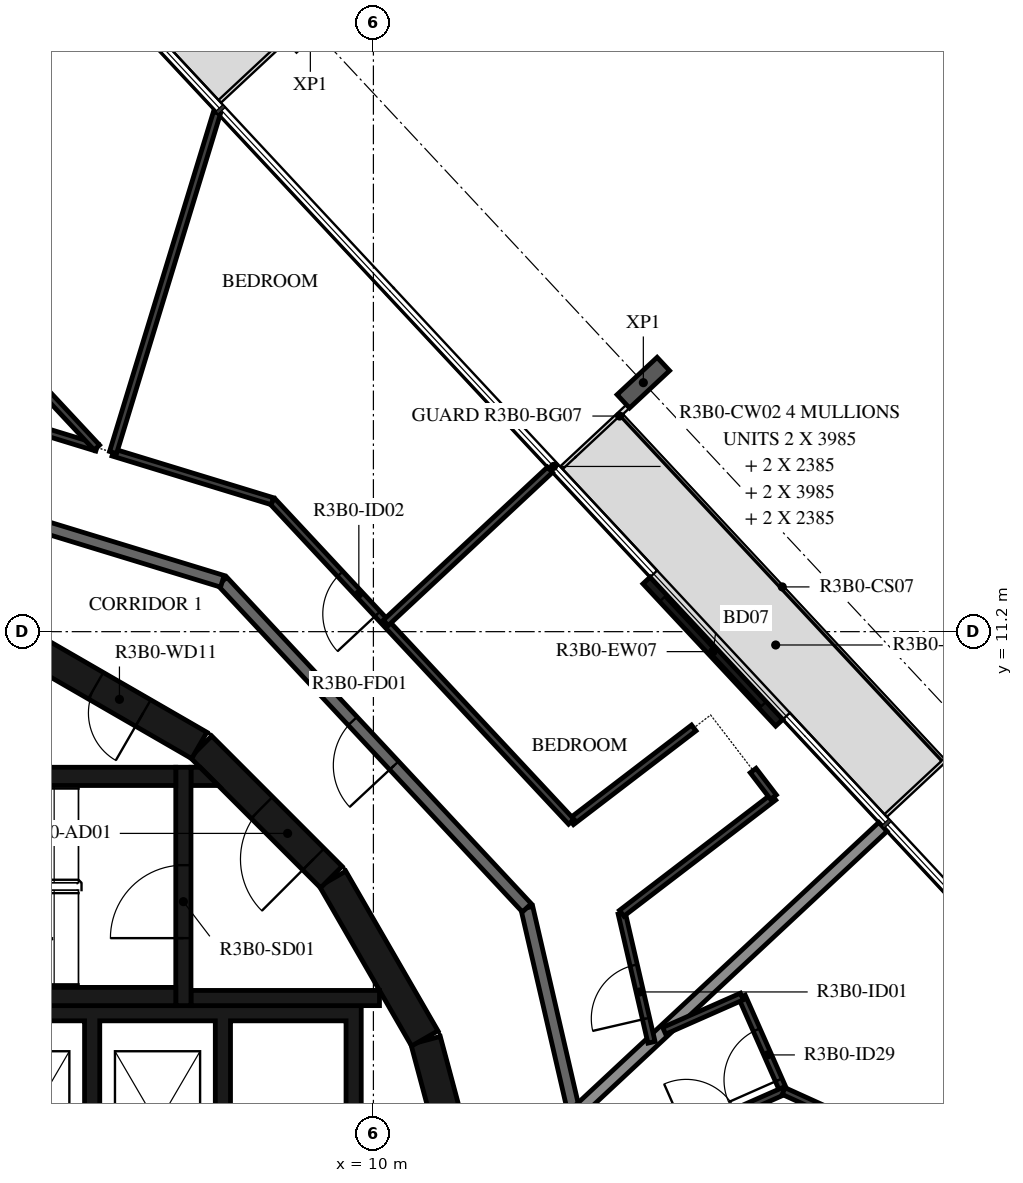
"""IFC4 building model, lengths in metres.
Left out: names, types, materials, properties, quantities, classifications, styles, units other than length and angle.
Written with IfcOpenShell. Run it as: python <this file> out.ifc"""

import sys

from ifc_helpers import new_model, si_unit, direction, frame, frame_2d, origin, origin_2d, place, context, subcontext, project, spatial, polyline, rectangle, i_section, outline, extrude, element, fill, save


model = new_model("IFC4")
c1 = context("Model", 3, precision=1e-05, world=origin(), true_north=direction((0.0, 1.0)))
c2 = subcontext(c1, "Body", "Model", "MODEL_VIEW")
j1 = project(units=[si_unit("LENGTHUNIT", "METRE"), si_unit("PLANEANGLEUNIT", "RADIAN")], contexts=[c1])
p1 = place(None, origin())
s1 = spatial("IfcSite", under=j1, at=p1, CompositionType="ELEMENT")
p2 = place(p1, origin())
s2 = spatial("IfcBuilding", under=s1, at=p2, CompositionType="ELEMENT")
p3 = place(p2, frame((0.0, 0.0, 127.4)))
s3 = spatial("IfcBuildingStorey", under=s2, at=p3, CompositionType="ELEMENT", Elevation=127.4)
p4 = place(p3, frame((14.439, 15.294, -0.38), z_axis=(0.0, 0.0, 1.0), x_axis=(0.68199801865, -0.731354019992, 0.0)))
e1 = element("IfcColumn", 1, at=p4, inside=s3, PredefinedType="COLUMN", context=c2, shape_type="SweptSolid", body=[
    extrude(i_section(OverallWidth=0.3, OverallDepth=0.9, WebThickness=0.019, FlangeThickness=0.035, FilletRadius=0.03, at=origin_2d()), origin(), (0.0, 0.0, 1.0), 3.5),
])
p5 = place(p3, frame((16.674, 9.701, 0.0), z_axis=(0.0, 0.0, 1.0), x_axis=(-0.681994703002, 0.731357111866, 0.0)))
e2 = element("IfcWall", 2, at=p5, inside=s3, PredefinedType="STANDARD", context=c2, shape_type="SweptSolid", body=[
    extrude(rectangle(XDim=3.2, YDim=0.16, at=frame_2d((1.6, 0.0))), origin(), (0.0, 0.0, 1.0), 3.12),
])
p6 = place(p5, frame((0.4, 0.0, 0.0)))
e3 = element("IfcOpeningElement", 3, at=p6, cuts=e2, PredefinedType="OPENING", context=c2, shape_type="SweptSolid", body=[
    extrude(rectangle(XDim=2.4, YDim=2.4, at=frame_2d((1.2, 1.2))), frame((0.0, 0.09, 0.0), z_axis=(0.0, -1.0, 0.0), x_axis=(1.0, 0.0, 0.0)), (0.0, 0.0, 1.0), 0.18),
])
for number, where, z_axis, x_axis in (
    (4, (11.643, 1.55, 0.0), (0.0, 0.0, 1.0), (-0.259, 0.966, 0.0)),
    (5, (10.845, 4.51, 0.0), (0.0, 0.0, 1.0), (-0.5, 0.866, 0.0)),
):
    element("IfcWall", number, at=place(p3, frame(where, z_axis=z_axis, x_axis=x_axis)), inside=s3, PredefinedType="SHEAR", context=c2, shape_type="SweptSolid", body=[
        extrude(rectangle(XDim=3.033, YDim=0.5, at=frame_2d((1.516, 0.0))), origin(), (0.0, 0.0, 1.0), 3.12),
    ])
p7 = place(p3, frame((9.308, 7.164, 0.0), z_axis=(0.0, 0.0, 1.0), x_axis=(-0.707106781187, 0.707106781187, 0.0)))
e6 = element("IfcWall", 6, at=p7, inside=s3, PredefinedType="SHEAR", context=c2, shape_type="SweptSolid", body=[
    extrude(rectangle(XDim=3.032, YDim=0.5, at=frame_2d((1.516, 0.0))), origin(), (0.0, 0.0, 1.0), 3.12),
])
p8 = place(p7, frame((0.416, 0.0, 0.0)))
e7 = element("IfcOpeningElement", 7, at=p8, cuts=e6, PredefinedType="OPENING", context=c2, shape_type="SweptSolid", body=[
    extrude(rectangle(XDim=1.2, YDim=2.1, at=frame_2d((0.6, 1.05))), frame((0.0, 0.26, 0.0), z_axis=(0.0, -1.0, 0.0), x_axis=(1.0, 0.0, 0.0)), (0.0, 0.0, 1.0), 0.52),
])
p9 = place(p3, frame((7.137, 9.329, 0.0), z_axis=(0.0, 0.0, 1.0), x_axis=(-0.865975092491, 0.500087131594, 0.0)))
e8 = element("IfcWall", 8, at=p9, inside=s3, PredefinedType="SHEAR", context=c2, shape_type="SweptSolid", body=[
    extrude(rectangle(XDim=3.033, YDim=0.5, at=frame_2d((1.516, 0.0))), origin(), (0.0, 0.0, 1.0), 3.12),
])
p10 = place(p9, frame((1.066, 0.0, 0.0)))
e9 = element("IfcOpeningElement", 9, at=p10, cuts=e8, PredefinedType="OPENING", context=c2, shape_type="SweptSolid", body=[
    extrude(rectangle(XDim=0.9, YDim=2.1, at=frame_2d((0.45, 1.05))), frame((0.0, 0.26, 0.0), z_axis=(0.0, -1.0, 0.0), x_axis=(1.0, 0.0, 0.0)), (0.0, 0.0, 1.0), 0.52),
])
for number, where, z_axis, x_axis in (
    (10, (0.0, 5.2, 0.0), (0.0, 0.0, 1.0), (1.0, 0.0, 0.0)),
    (11, (0.0, 8.82, 0.0), (0.0, 0.0, 1.0), (1.0, 0.0, 0.0)),
):
    element("IfcWall", number, at=place(p3, frame(where, z_axis=z_axis, x_axis=x_axis)), inside=s3, PredefinedType="SHEAR", context=c2, shape_type="SweptSolid", body=[
        extrude(rectangle(XDim=6.75, YDim=0.3, at=frame_2d((3.375, 0.0))), origin(), (0.0, 0.0, 1.0), 3.12),
    ])
p11 = place(p3, frame((6.875, 5.05, 0.0), z_axis=(0.0, 0.0, 1.0), x_axis=(0.0, 1.0, 0.0)))
e12 = element("IfcWall", 12, at=p11, inside=s3, PredefinedType="SHEAR", context=c2, shape_type="SweptSolid", body=[
    extrude(rectangle(XDim=3.92, YDim=0.25, at=frame_2d((1.96, 0.0))), origin(), (0.0, 0.0, 1.0), 3.12),
])
p12 = place(p11, frame((1.11, 0.0, 0.0)))
e13 = element("IfcOpeningElement", 13, at=p12, cuts=e12, PredefinedType="OPENING", context=c2, shape_type="SweptSolid", body=[
    extrude(rectangle(XDim=1.2, YDim=2.1, at=frame_2d((0.6, 1.05))), frame((0.0, 0.135, 0.0), z_axis=(0.0, -1.0, 0.0), x_axis=(1.0, 0.0, 0.0)), (0.0, 0.0, 1.0), 0.27),
])
p13 = place(p3, frame((7.0, 5.175, 0.0), z_axis=(0.0, 0.0, 1.0), x_axis=(1.0, 0.0, 0.0)))
e14 = element("IfcWall", 14, at=p13, inside=s3, PredefinedType="SHEAR", context=c2, shape_type="SweptSolid", body=[
    extrude(rectangle(XDim=3.1, YDim=0.25, at=frame_2d((1.55, 0.0))), origin(), (0.0, 0.0, 1.0), 3.12),
])
p14 = place(p3, origin())
e15 = element("IfcWall", 15, at=p14, inside=s3, PredefinedType="SHEAR", context=c2, shape_type="SweptSolid", body=[
    extrude(outline(polyline([(7.448, 8.67), (7.0, 8.67), (7.0, 8.97), (7.148, 8.97), (7.448, 8.67)])), origin(), (0.0, 0.0, 1.0), 3.12),
])
p15 = place(p3, origin())
e16 = element("IfcWall", 16, at=p15, inside=s3, PredefinedType="SHEAR", context=c2, shape_type="SweptSolid", body=[
    extrude(outline(polyline([(-9.55, 4.8), (-7.65, 4.8), (-7.65, 1.9), (-7.4, 1.9), (-7.4, 4.8), (-5.5, 4.8), (-5.5, 1.9), (-5.25, 1.9), (-5.25, 4.8), (-3.35, 4.8), (-3.35, 1.9), (-3.1, 1.9), (-3.1, 4.8), (-1.2, 4.8), (-1.2, 1.9), (-0.95, 1.9), (-0.95, 4.8), (3.1, 4.8), (3.1, 1.9), (3.35, 1.9), (3.35, 4.8), (5.25, 4.8), (5.25, 1.9), (5.5, 1.9), (5.5, 4.8), (7.4, 4.8), (7.4, 1.9), (7.65, 1.9), (7.65, 4.8), (9.55, 4.8), (9.55, 1.9), (9.8, 1.9), (9.8, 4.8), (9.8, 5.05), (-9.8, 5.05), (-9.8, 4.8), (-9.8, 1.9), (-9.55, 1.9), (-9.55, 4.8)])), origin(), (0.0, 0.0, 1.0), 3.12),
])
p16 = place(p3, frame((14.175, -0.495, 0.0), z_axis=(0.0, 0.0, 1.0), x_axis=(-0.224922649383, 0.974376622151, 0.0)))
e17 = element("IfcWall", 17, at=p16, inside=s3, PredefinedType="STANDARD", context=c2, shape_type="SweptSolid", body=[
    extrude(rectangle(XDim=7.342, YDim=0.2, at=frame_2d((3.671, 0.0))), origin(), (0.0, 0.0, 1.0), 3.12),
])
p17 = place(p16, frame((2.655, 0.0, 0.0)))
e18 = element("IfcOpeningElement", 18, at=p17, cuts=e17, PredefinedType="OPENING", context=c2, shape_type="SweptSolid", body=[
    extrude(rectangle(XDim=1.0, YDim=2.1, at=frame_2d((0.5, 1.05))), frame((0.0, 0.11, 0.0), z_axis=(0.0, -1.0, 0.0), x_axis=(1.0, 0.0, 0.0)), (0.0, 0.0, 1.0), 0.22),
])
p18 = place(p3, frame((12.523, 6.659, 0.0), z_axis=(0.0, 0.0, 1.0), x_axis=(-0.682001841105, 0.731350455479, 0.0)))
e19 = element("IfcWall", 19, at=p18, inside=s3, PredefinedType="STANDARD", context=c2, shape_type="SweptSolid", body=[
    extrude(rectangle(XDim=7.342, YDim=0.2, at=frame_2d((3.671, 0.0))), origin(), (0.0, 0.0, 1.0), 3.12),
])
p19 = place(p18, frame((3.2, 0.0, 0.0)))
e20 = element("IfcOpeningElement", 20, at=p19, cuts=e19, PredefinedType="OPENING", context=c2, shape_type="SweptSolid", body=[
    extrude(rectangle(XDim=1.0, YDim=2.1, at=frame_2d((0.5, 1.05))), frame((0.0, 0.11, 0.0), z_axis=(0.0, -1.0, 0.0), x_axis=(1.0, 0.0, 0.0)), (0.0, 0.0, 1.0), 0.22),
])
p20 = place(p3, frame((7.516, 12.028, 0.0), z_axis=(0.0, 0.0, 1.0), x_axis=(-0.956306642771, 0.292365533182, 0.0)))
e21 = element("IfcWall", 21, at=p20, inside=s3, PredefinedType="STANDARD", context=c2, shape_type="SweptSolid", body=[
    extrude(rectangle(XDim=7.342, YDim=0.2, at=frame_2d((3.671, 0.0))), origin(), (0.0, 0.0, 1.0), 3.12),
])
p21 = place(p3, frame((13.308, 3.261, 0.0), z_axis=(0.0, 0.0, 1.0), x_axis=(0.731356087831, 0.681995801154, 0.0)))
e22 = element("IfcWall", 22, at=p21, inside=s3, PredefinedType="STANDARD", context=c2, shape_type="SweptSolid", body=[
    extrude(rectangle(XDim=6.934, YDim=0.2, at=frame_2d((3.467, 0.0))), origin(), (0.0, 0.0, 1.0), 2.73),
])
p22 = place(p3, frame((14.573, 4.447, 0.0), z_axis=(0.0, 0.0, 1.0), x_axis=(-0.225006886074, 0.97435717333, 0.0)))
e23 = element("IfcWall", 23, at=p22, inside=s3, PredefinedType="PARTITIONING", context=c2, shape_type="SweptSolid", body=[
    extrude(rectangle(XDim=2.178, YDim=0.12, at=frame_2d((1.089, 0.0))), origin(), (0.0, 0.0, 1.0), 3.12),
])
p23 = place(p22, frame((0.4, 0.0, 0.0)))
e24 = element("IfcOpeningElement", 24, at=p23, cuts=e23, PredefinedType="OPENING", context=c2, shape_type="SweptSolid", body=[
    extrude(rectangle(XDim=0.9, YDim=2.1, at=frame_2d((0.45, 1.05))), frame((0.0, 0.07, 0.0), z_axis=(0.0, -1.0, 0.0), x_axis=(1.0, 0.0, 0.0)), (0.0, 0.0, 1.0), 0.14),
])
p24 = place(p3, frame((14.083, 6.569, 0.0), z_axis=(0.0, 0.0, 1.0), x_axis=(0.794099847012, 0.607787325449, 0.0)))
e25 = element("IfcWall", 25, at=p24, inside=s3, PredefinedType="PARTITIONING", context=c2, shape_type="SweptSolid", body=[
    extrude(rectangle(XDim=3.144, YDim=0.12, at=frame_2d((1.572, 0.0))), origin(), (0.0, 0.0, 1.0), 3.12),
])
p25 = place(p3, frame((16.58, 8.479, 0.0), z_axis=(0.0, 0.0, 1.0), x_axis=(-0.607993560766, 0.793941956359, 0.0)))
e26 = element("IfcWall", 26, at=p25, inside=s3, PredefinedType="PARTITIONING", context=c2, shape_type="SweptSolid", body=[
    extrude(rectangle(XDim=0.55, YDim=0.12, at=frame_2d((0.275, 0.0))), origin(), (0.0, 0.0, 1.0), 3.12),
])
p26 = place(p3, frame((15.268, 9.617, 0.0), z_axis=(0.0, 0.0, 1.0), x_axis=(-0.79409554088, -0.607792951551, 0.0)))
e27 = element("IfcWall", 27, at=p26, inside=s3, PredefinedType="PARTITIONING", context=c2, shape_type="SweptSolid", body=[
    extrude(rectangle(XDim=2.537, YDim=0.12, at=frame_2d((1.269, 0.0))), origin(), (0.0, 0.0, 1.0), 3.12),
])
p27 = place(p3, frame((13.254, 8.075, 0.0), z_axis=(0.0, 0.0, 1.0), x_axis=(-0.681995901471, 0.731355994285, 0.0)))
e28 = element("IfcWall", 28, at=p27, inside=s3, PredefinedType="PARTITIONING", context=c2, shape_type="SweptSolid", body=[
    extrude(rectangle(XDim=7.207, YDim=0.12, at=frame_2d((3.603, 0.0))), origin(), (0.0, 0.0, 1.0), 3.12),
])
p28 = place(p27, frame((4.672, 0.0, 0.0)))
e29 = element("IfcOpeningElement", 29, at=p28, cuts=e28, PredefinedType="OPENING", context=c2, shape_type="SweptSolid", body=[
    extrude(rectangle(XDim=0.9, YDim=2.1, at=frame_2d((0.45, 1.05))), frame((0.0, 0.07, 0.0), z_axis=(0.0, -1.0, 0.0), x_axis=(1.0, 0.0, 0.0)), (0.0, 0.0, 1.0), 0.14),
])
p29 = place(p3, frame((8.339, 13.345, 0.0), z_axis=(0.0, 0.0, 1.0), x_axis=(-0.956324586315, 0.292306834695, 0.0)))
e30 = element("IfcWall", 30, at=p29, inside=s3, PredefinedType="PARTITIONING", context=c2, shape_type="SweptSolid", body=[
    extrude(rectangle(XDim=2.74, YDim=0.12, at=frame_2d((1.37, 0.0))), origin(), (0.0, 0.0, 1.0), 3.12),
])
p30 = place(p3, frame((5.453, 14.228, 0.0), z_axis=(0.0, 0.0, 1.0), x_axis=(-0.95630868333, 0.292358858576, 0.0)))
e31 = element("IfcWall", 31, at=p30, inside=s3, PredefinedType="PARTITIONING", context=c2, shape_type="SweptSolid", body=[
    extrude(rectangle(XDim=5.127, YDim=0.12, at=frame_2d((2.564, 0.0))), origin(), (0.0, 0.0, 1.0), 3.12),
])
p31 = place(p30, frame((1.5, 0.0, 0.0)))
e32 = element("IfcOpeningElement", 32, at=p31, cuts=e31, PredefinedType="OPENING", context=c2, shape_type="SweptSolid", body=[
    extrude(rectangle(XDim=0.9, YDim=2.1, at=frame_2d((0.45, 1.05))), frame((0.0, 0.07, 0.0), z_axis=(0.0, -1.0, 0.0), x_axis=(1.0, 0.0, 0.0)), (0.0, 0.0, 1.0), 0.14),
])
p32 = place(p3, frame((12.903, 13.862, 0.0), z_axis=(0.0, 0.0, 1.0), x_axis=(-0.731380732155, -0.68196937221, 0.0)))
e33 = element("IfcWall", 33, at=p32, inside=s3, PredefinedType="PARTITIONING", context=c2, shape_type="SweptSolid", body=[
    extrude(rectangle(XDim=3.691, YDim=0.12, at=frame_2d((1.845, 0.0))), origin(), (0.0, 0.0, 1.0), 2.73),
])
p33 = place(p3, frame((7.427, 19.734, 0.0), z_axis=(0.0, 0.0, 1.0), x_axis=(-0.292365007065, -0.956306803617, 0.0)))
e34 = element("IfcWall", 34, at=p33, inside=s3, PredefinedType="PARTITIONING", context=c2, shape_type="SweptSolid", body=[
    extrude(rectangle(XDim=5.844, YDim=0.12, at=frame_2d((2.922, 0.0))), origin(), (0.0, 0.0, 1.0), 3.12),
])
p34 = place(p3, frame((-2.646, 22.912, 0.0), z_axis=(0.0, 0.0, 1.0), x_axis=(0.68200318122, -0.731349205788, 0.0)))
e35 = element("IfcWall", 35, at=p34, inside=s3, PredefinedType="PARTITIONING", context=c2, shape_type="SweptSolid", body=[
    extrude(rectangle(XDim=11.874, YDim=0.12, at=frame_2d((5.937, 0.0))), origin(), (0.0, 0.0, 1.0), 3.12),
])
p35 = place(p34, frame((5.752, 0.0, 0.0)))
e36 = element("IfcOpeningElement", 36, at=p35, cuts=e35, PredefinedType="OPENING", context=c2, shape_type="SweptSolid", body=[
    extrude(rectangle(XDim=0.9, YDim=2.1, at=frame_2d((0.45, 1.05))), frame((0.0, 0.07, 0.0), z_axis=(0.0, -1.0, 0.0), x_axis=(1.0, 0.0, 0.0)), (0.0, 0.0, 1.0), 0.14),
])
p36 = place(p34, frame((1.324, 0.0, 0.0)))
e37 = element("IfcOpeningElement", 37, at=p36, cuts=e35, PredefinedType="OPENING", context=c2, shape_type="SweptSolid", body=[
    extrude(rectangle(XDim=0.9, YDim=2.1, at=frame_2d((0.45, 1.05))), frame((0.0, 0.07, 0.0), z_axis=(0.0, -1.0, 0.0), x_axis=(1.0, 0.0, 0.0)), (0.0, 0.0, 1.0), 0.14),
])
p37 = place(p3, frame((16.747, 3.645, 0.0), z_axis=(0.0, 0.0, 1.0), x_axis=(-0.40401852801, 0.914750801598, 0.0)))
e38 = element("IfcWall", 38, at=p37, inside=s3, PredefinedType="PARTITIONING", context=c2, shape_type="SweptSolid", body=[
    extrude(rectangle(XDim=1.7, YDim=0.12, at=frame_2d((0.85, 0.0))), origin(), (0.0, 0.0, 1.0), 3.12),
])
p38 = place(p37, frame((0.2, 0.0, 0.0)))
e39 = element("IfcOpeningElement", 39, at=p38, cuts=e38, PredefinedType="OPENING", context=c2, shape_type="SweptSolid", body=[
    extrude(rectangle(XDim=0.9, YDim=2.1, at=frame_2d((0.45, 1.05))), frame((0.0, 0.07, 0.0), z_axis=(0.0, -1.0, 0.0), x_axis=(1.0, 0.0, 0.0)), (0.0, 0.0, 1.0), 0.14),
])
p39 = place(p3, frame((16.06, 5.2, 0.0), z_axis=(0.0, 0.0, 1.0), x_axis=(-0.91479626238, -0.403915583179, 0.0)))
e40 = element("IfcWall", 40, at=p39, inside=s3, PredefinedType="PARTITIONING", context=c2, shape_type="SweptSolid", body=[
    extrude(rectangle(XDim=1.397, YDim=0.12, at=frame_2d((0.698, 0.0))), origin(), (0.0, 0.0, 1.0), 3.12),
])
p40 = place(p3, frame((14.962, 2.857, 0.0), z_axis=(0.0, 0.0, 1.0), x_axis=(0.914732858216, 0.404059151734, 0.0)))
e41 = element("IfcWall", 41, at=p40, inside=s3, PredefinedType="PARTITIONING", context=c2, shape_type="SweptSolid", body=[
    extrude(rectangle(XDim=1.951, YDim=0.12, at=frame_2d((0.976, 0.0))), origin(), (0.0, 0.0, 1.0), 3.12),
])
p41 = place(p40, frame((0.2, 0.0, 0.0)))
e42 = element("IfcOpeningElement", 42, at=p41, cuts=e41, PredefinedType="OPENING", context=c2, shape_type="SweptSolid", body=[
    extrude(rectangle(XDim=0.9, YDim=2.1, at=frame_2d((0.45, 1.05))), frame((0.0, 0.07, 0.0), z_axis=(0.0, -1.0, 0.0), x_axis=(1.0, 0.0, 0.0)), (0.0, 0.0, 1.0), 0.14),
])
p42 = place(p3, frame((16.747, 3.645, 0.0), z_axis=(0.0, 0.0, 1.0), x_axis=(0.910796273175, -0.412856087238, 0.0)))
e43 = element("IfcWall", 43, at=p42, inside=s3, PredefinedType="PARTITIONING", context=c2, shape_type="SweptSolid", body=[
    extrude(rectangle(XDim=10.901, YDim=0.12, at=frame_2d((5.45, 0.0))), origin(), (0.0, 0.0, 1.0), 3.12),
])
p43 = place(p6, origin())
e44 = element("IfcDoor", 44, at=p43, inside=s3, OperationType="DOUBLE_DOOR_SLIDING", PredefinedType="DOOR", context=c2, shape_type="SweptSolid", body=[
    extrude(rectangle(XDim=2.4, YDim=2.4, at=frame_2d((1.2, 1.2))), frame((0.0, 0.025, 0.0), z_axis=(0.0, -1.0, 0.0), x_axis=(1.0, 0.0, 0.0)), (0.0, 0.0, 1.0), 0.05),
])
fill(e3, e44)
p44 = place(p12, origin())
e45 = element("IfcDoor", 45, at=p44, inside=s3, OperationType="SINGLE_SWING_LEFT", PredefinedType="DOOR", context=c2, shape_type="SweptSolid", body=[
    extrude(rectangle(XDim=1.2, YDim=2.1, at=frame_2d((0.6, 1.05))), frame((0.0, 0.025, 0.0), z_axis=(0.0, -1.0, 0.0), x_axis=(1.0, 0.0, 0.0)), (0.0, 0.0, 1.0), 0.05),
])
fill(e13, e45)
p45 = place(p8, origin())
e46 = element("IfcDoor", 46, at=p45, inside=s3, OperationType="SINGLE_SWING_RIGHT", PredefinedType="DOOR", context=c2, shape_type="SweptSolid", body=[
    extrude(rectangle(XDim=1.2, YDim=2.1, at=frame_2d((0.6, 1.05))), frame((0.0, 0.025, 0.0), z_axis=(0.0, -1.0, 0.0), x_axis=(1.0, 0.0, 0.0)), (0.0, 0.0, 1.0), 0.05),
])
fill(e7, e46)
p46 = place(p10, origin())
e47 = element("IfcDoor", 47, at=p46, inside=s3, OperationType="SINGLE_SWING_RIGHT", PredefinedType="DOOR", context=c2, shape_type="SweptSolid", body=[
    extrude(rectangle(XDim=0.9, YDim=2.1, at=frame_2d((0.45, 1.05))), frame((0.0, 0.025, 0.0), z_axis=(0.0, -1.0, 0.0), x_axis=(1.0, 0.0, 0.0)), (0.0, 0.0, 1.0), 0.05),
])
fill(e9, e47)
p47 = place(p19, origin())
e48 = element("IfcDoor", 48, at=p47, inside=s3, OperationType="SINGLE_SWING_RIGHT", PredefinedType="DOOR", context=c2, shape_type="SweptSolid", body=[
    extrude(rectangle(XDim=1.0, YDim=2.1, at=frame_2d((0.5, 1.05))), frame((0.0, 0.025, 0.0), z_axis=(0.0, -1.0, 0.0), x_axis=(1.0, 0.0, 0.0)), (0.0, 0.0, 1.0), 0.05),
])
fill(e20, e48)
p48 = place(p23, origin())
e49 = element("IfcDoor", 49, at=p48, inside=s3, OperationType="SINGLE_SWING_LEFT", PredefinedType="DOOR", context=c2, shape_type="SweptSolid", body=[
    extrude(rectangle(XDim=0.9, YDim=2.1, at=frame_2d((0.45, 1.05))), frame((0.0, 0.025, 0.0), z_axis=(0.0, -1.0, 0.0), x_axis=(1.0, 0.0, 0.0)), (0.0, 0.0, 1.0), 0.05),
])
fill(e24, e49)
p49 = place(p28, origin())
e50 = element("IfcDoor", 50, at=p49, inside=s3, OperationType="SINGLE_SWING_RIGHT", PredefinedType="DOOR", context=c2, shape_type="SweptSolid", body=[
    extrude(rectangle(XDim=0.9, YDim=2.1, at=frame_2d((0.45, 1.05))), frame((0.0, 0.025, 0.0), z_axis=(0.0, -1.0, 0.0), x_axis=(1.0, 0.0, 0.0)), (0.0, 0.0, 1.0), 0.05),
])
fill(e29, e50)
p50 = place(p38, origin())
e51 = element("IfcDoor", 51, at=p50, inside=s3, OperationType="SINGLE_SWING_LEFT", PredefinedType="DOOR", context=c2, shape_type="SweptSolid", body=[
    extrude(rectangle(XDim=0.9, YDim=2.1, at=frame_2d((0.45, 1.05))), frame((0.0, 0.025, 0.0), z_axis=(0.0, -1.0, 0.0), x_axis=(1.0, 0.0, 0.0)), (0.0, 0.0, 1.0), 0.05),
])
fill(e39, e51)
save(model, sys.argv[1])
